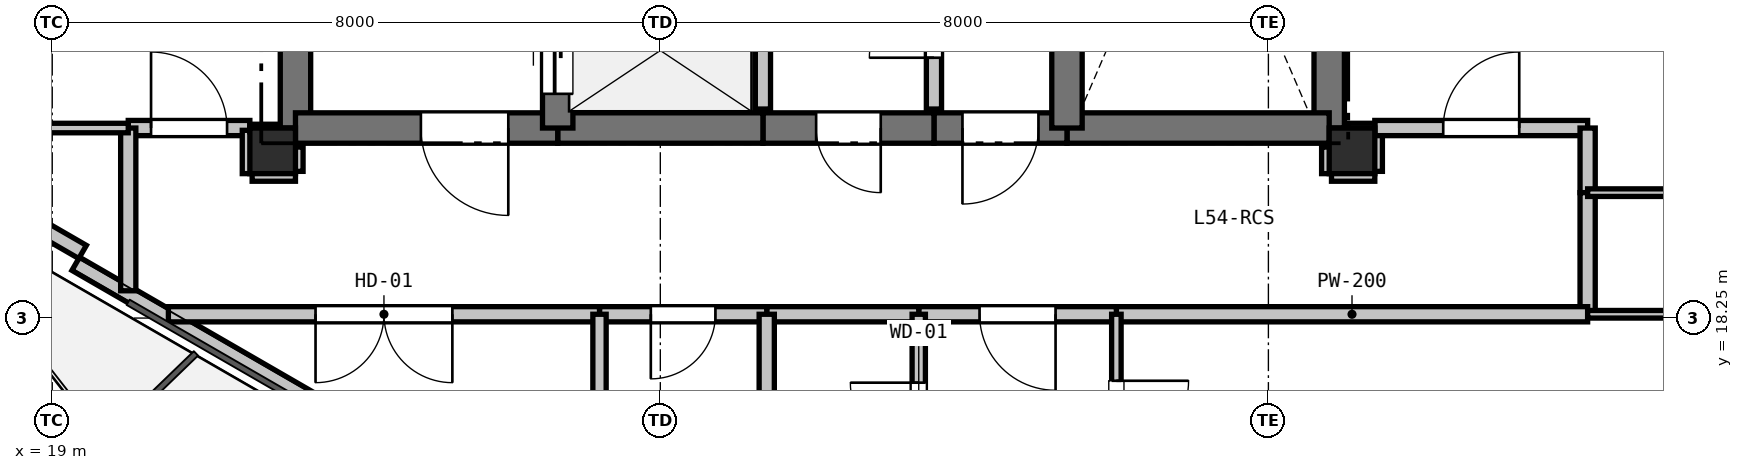
"""IFC4 building model, lengths in metres.
Left out: names, types, materials, properties, quantities, classifications, styles, units other than length and angle.
Written with IfcOpenShell. Run it as: python <this file> out.ifc"""

import sys

from ifc_helpers import new_model, si_unit, direction, frame, frame_2d, origin, origin_2d, place, context, subcontext, project, spatial, rectangle, extrude, element, fill, save


model = new_model("IFC4")
c1 = context("Model", 3, precision=1e-05, world=origin(), true_north=direction((0.0, 1.0)))
c2 = subcontext(c1, "Body", "Model", "MODEL_VIEW")
j1 = project(units=[si_unit("LENGTHUNIT", "METRE"), si_unit("PLANEANGLEUNIT", "RADIAN")], contexts=[c1])
p1 = place(None, origin())
s1 = spatial("IfcSite", under=j1, at=p1, CompositionType="ELEMENT")
p2 = place(p1, origin())
s2 = spatial("IfcBuilding", under=s1, at=p2, CompositionType="ELEMENT")
p3 = place(p2, frame((0.0, 0.0, 195.3)))
s3 = spatial("IfcBuildingStorey", under=s2, at=p3, CompositionType="ELEMENT", Elevation=195.3)
for number, where, z_axis, x_axis in (
    (1, (21.9, 20.45, 0.0), (0.0, 0.0, 1.0), (1.0, 0.0, 0.0)),
    (2, (36.1, 20.45, 0.0), (0.0, 0.0, 1.0), (1.0, 0.0, 0.0)),
):
    element("IfcColumn", number, at=place(p3, frame(where, z_axis=z_axis, x_axis=x_axis)), inside=s3, PredefinedType="COLUMN", context=c2, shape_type="SweptSolid", body=[
        extrude(rectangle(XDim=0.6, YDim=0.6, at=origin_2d()), origin(), (0.0, 0.0, 1.0), 3.3),
    ])
p4 = place(p3, frame((27.102, 14.464, 0.0), z_axis=(0.0, 0.0, 1.0), x_axis=(-0.866020680503, 0.500008180874, 0.0)))
e3 = element("IfcWall", 3, at=p4, inside=s3, PredefinedType="PARAPET", context=c2, shape_type="SweptSolid", body=[
    extrude(rectangle(XDim=8.999, YDim=0.2, at=frame_2d((4.5, 0.0))), origin(), (0.0, 0.0, 1.0), 0.2),
])
p5 = place(p3, frame((19.399, 19.12, 0.0), z_axis=(0.0, 0.0, 1.0), x_axis=(-0.86605165483, 0.499954529098, 0.0)))
e4 = element("IfcWall", 4, at=p5, inside=s3, PredefinedType="PARAPET", context=c2, shape_type="SweptSolid", body=[
    extrude(rectangle(XDim=1.7, YDim=0.2, at=frame_2d((0.85, 0.0))), origin(), (0.0, 0.0, 1.0), 2.69),
])
p6 = place(p3, frame((22.2, 20.75, 0.0), z_axis=(0.0, 0.0, 1.0), x_axis=(0.0, 1.0, 0.0)))
e5 = element("IfcWall", 5, at=p6, inside=s3, PredefinedType="SHEAR", context=c2, shape_type="SweptSolid", body=[
    extrude(rectangle(XDim=4.65, YDim=0.4, at=frame_2d((2.325, 0.0))), origin(), (0.0, 0.0, 1.0), 3.07),
])
p7 = place(p3, frame((35.8, 28.1, 0.0), z_axis=(0.0, 0.0, 1.0), x_axis=(0.0, -1.0, 0.0)))
e6 = element("IfcWall", 6, at=p7, inside=s3, PredefinedType="SHEAR", context=c2, shape_type="SweptSolid", body=[
    extrude(rectangle(XDim=7.35, YDim=0.4, at=frame_2d((3.675, 0.0))), origin(), (0.0, 0.0, 1.0), 3.07),
])
p8 = place(p3, frame((35.8, 20.75, 0.0), z_axis=(0.0, 0.0, 1.0), x_axis=(-1.0, 0.0, 0.0)))
e7 = element("IfcWall", 7, at=p8, inside=s3, PredefinedType="SHEAR", context=c2, shape_type="SweptSolid", body=[
    extrude(rectangle(XDim=3.45, YDim=0.4, at=frame_2d((1.725, 0.0))), origin(), (0.0, 0.0, 1.0), 3.07),
])
p9 = place(p3, frame((32.35, 20.75, 0.0), z_axis=(0.0, 0.0, 1.0), x_axis=(-1.0, 0.0, 0.0)))
e8 = element("IfcWall", 8, at=p9, inside=s3, PredefinedType="SHEAR", context=c2, shape_type="SweptSolid", body=[
    extrude(rectangle(XDim=1.75, YDim=0.4, at=frame_2d((0.875, 0.0))), origin(), (0.0, 0.0, 1.0), 3.07),
])
p10 = place(p9, frame((0.375, 0.0, 0.0)))
e9 = element("IfcOpeningElement", 9, at=p10, cuts=e8, PredefinedType="OPENING", context=c2, shape_type="SweptSolid", body=[
    extrude(rectangle(XDim=1.0, YDim=2.15, at=frame_2d((0.5, 1.075))), frame((0.0, 0.21, 0.0), z_axis=(0.0, -1.0, 0.0), x_axis=(1.0, 0.0, 0.0)), (0.0, 0.0, 1.0), 0.42),
])
p11 = place(p3, frame((30.6, 20.75, 0.0), z_axis=(0.0, 0.0, 1.0), x_axis=(-1.0, 0.0, 0.0)))
e10 = element("IfcWall", 10, at=p11, inside=s3, PredefinedType="SHEAR", context=c2, shape_type="SweptSolid", body=[
    extrude(rectangle(XDim=2.25, YDim=0.4, at=frame_2d((1.125, 0.0))), origin(), (0.0, 0.0, 1.0), 3.07),
])
p12 = place(p11, frame((0.7, 0.0, 0.0)))
e11 = element("IfcOpeningElement", 11, at=p12, cuts=e10, PredefinedType="OPENING", context=c2, shape_type="SweptSolid", body=[
    extrude(rectangle(XDim=0.85, YDim=2.1, at=frame_2d((0.425, 1.05))), frame((0.0, 0.21, 0.0), z_axis=(0.0, -1.0, 0.0), x_axis=(1.0, 0.0, 0.0)), (0.0, 0.0, 1.0), 0.42),
])
p13 = place(p3, frame((28.35, 20.75, 0.0), z_axis=(0.0, 0.0, 1.0), x_axis=(-1.0, 0.0, 0.0)))
e12 = element("IfcWall", 12, at=p13, inside=s3, PredefinedType="SHEAR", context=c2, shape_type="SweptSolid", body=[
    extrude(rectangle(XDim=2.7, YDim=0.4, at=frame_2d((1.35, 0.0))), origin(), (0.0, 0.0, 1.0), 3.07),
])
p14 = place(p3, frame((25.65, 20.75, 0.0), z_axis=(0.0, 0.0, 1.0), x_axis=(-1.0, 0.0, 0.0)))
e13 = element("IfcWall", 13, at=p14, inside=s3, PredefinedType="SHEAR", context=c2, shape_type="SweptSolid", body=[
    extrude(rectangle(XDim=3.45, YDim=0.4, at=frame_2d((1.725, 0.0))), origin(), (0.0, 0.0, 1.0), 3.07),
])
p15 = place(p14, frame((0.65, 0.0, 0.0)))
e14 = element("IfcOpeningElement", 14, at=p15, cuts=e13, PredefinedType="OPENING", context=c2, shape_type="SweptSolid", body=[
    extrude(rectangle(XDim=1.15, YDim=2.15, at=frame_2d((0.575, 1.075))), frame((0.0, 0.21, 0.0), z_axis=(0.0, -1.0, 0.0), x_axis=(1.0, 0.0, 0.0)), (0.0, 0.0, 1.0), 0.42),
])
p16 = place(p3, frame((25.65, 20.75, 0.0), z_axis=(0.0, 0.0, 1.0), x_axis=(0.0, 1.0, 0.0)))
e15 = element("IfcWall", 15, at=p16, inside=s3, PredefinedType="SHEAR", context=c2, shape_type="SweptSolid", body=[
    extrude(rectangle(XDim=2.0, YDim=0.4, at=frame_2d((1.0, 0.0))), origin(), (0.0, 0.0, 1.0), 3.07),
])
p17 = place(p16, frame((0.45, 0.0, 0.0)))
e16 = element("IfcOpeningElement", 16, at=p17, cuts=e15, PredefinedType="OPENING", context=c2, shape_type="SweptSolid", body=[
    extrude(rectangle(XDim=1.1, YDim=2.15, at=frame_2d((0.55, 1.075))), frame((0.0, 0.21, 0.0), z_axis=(0.0, -1.0, 0.0), x_axis=(1.0, 0.0, 0.0)), (0.0, 0.0, 1.0), 0.42),
])
p18 = place(p3, frame((32.35, 20.75, 0.0), z_axis=(0.0, 0.0, 1.0), x_axis=(0.0, 1.0, 0.0)))
e17 = element("IfcWall", 17, at=p18, inside=s3, PredefinedType="SHEAR", context=c2, shape_type="SweptSolid", body=[
    extrude(rectangle(XDim=4.8, YDim=0.4, at=frame_2d((2.4, 0.0))), origin(), (0.0, 0.0, 1.0), 3.07),
])
p19 = place(p3, frame((28.35, 23.2, 0.0), z_axis=(0.0, 0.0, 1.0), x_axis=(0.0, -1.0, 0.0)))
e18 = element("IfcWall", 18, at=p19, inside=s3, PredefinedType="PARTITIONING", context=c2, shape_type="SweptSolid", body=[
    extrude(rectangle(XDim=2.2, YDim=0.2, at=frame_2d((1.1, 0.0))), origin(), (0.0, 0.0, 1.0), 3.07),
])
p20 = place(p3, frame((30.6, 21.0, 0.0), z_axis=(0.0, 0.0, 1.0), x_axis=(0.0, 1.0, 0.0)))
e19 = element("IfcWall", 19, at=p20, inside=s3, PredefinedType="PARTITIONING", context=c2, shape_type="SweptSolid", body=[
    extrude(rectangle(XDim=2.2, YDim=0.2, at=frame_2d((1.1, 0.0))), origin(), (0.0, 0.0, 1.0), 3.07),
])
p21 = place(p20, frame((0.675, 0.0, 0.0)))
e20 = element("IfcOpeningElement", 20, at=p21, cuts=e19, PredefinedType="OPENING", context=c2, shape_type="SweptSolid", body=[
    extrude(rectangle(XDim=0.85, YDim=2.1, at=frame_2d((0.425, 1.05))), frame((0.0, 0.11, 0.0), z_axis=(0.0, -1.0, 0.0), x_axis=(1.0, 0.0, 0.0)), (0.0, 0.0, 1.0), 0.22),
])
p22 = place(p3, frame((20.0, 20.75, 0.0), z_axis=(0.0, 0.0, 1.0), x_axis=(1.0, 0.0, 0.0)))
e21 = element("IfcWall", 21, at=p22, inside=s3, PredefinedType="PARTITIONING", context=c2, shape_type="SweptSolid", body=[
    extrude(rectangle(XDim=1.6, YDim=0.2, at=frame_2d((0.8, 0.0))), origin(), (0.0, 0.0, 1.0), 2.518),
])
p23 = place(p22, frame((0.3, 0.0, 0.0)))
e22 = element("IfcOpeningElement", 22, at=p23, cuts=e21, PredefinedType="OPENING", context=c2, shape_type="SweptSolid", body=[
    extrude(rectangle(XDim=1.0, YDim=2.15, at=frame_2d((0.5, 1.075))), frame((0.0, 0.11, 0.0), z_axis=(0.0, -1.0, 0.0), x_axis=(1.0, 0.0, 0.0)), (0.0, 0.0, 1.0), 0.22),
])
for number, where, z_axis, x_axis in (
    (23, (21.6, 20.72, 0.0), (0.0, 0.0, 1.0), (0.0, -1.0, 0.0)),
    (24, (21.63, 20.15, 0.0), (0.0, 0.0, 1.0), (1.0, 0.0, 0.0)),
):
    element("IfcWall", number, at=place(p3, frame(where, z_axis=z_axis, x_axis=x_axis)), inside=s3, PredefinedType="PARTITIONING", context=c2, shape_type="SweptSolid", body=[
        extrude(rectangle(XDim=0.57, YDim=0.2, at=frame_2d((0.285, 0.0))), origin(), (0.0, 0.0, 1.0), 2.518),
    ])
p24 = place(p3, frame((22.2, 20.18, 0.0), z_axis=(0.0, 0.0, 1.0), x_axis=(0.0, 1.0, 0.0)))
e25 = element("IfcWall", 25, at=p24, inside=s3, PredefinedType="PARTITIONING", context=c2, shape_type="SweptSolid", body=[
    extrude(rectangle(XDim=0.32, YDim=0.2, at=frame_2d((0.16, 0.0))), origin(), (0.0, 0.0, 1.0), 2.518),
])
p25 = place(p3, frame((35.8, 20.5, 0.0), z_axis=(0.0, 0.0, 1.0), x_axis=(0.0, -1.0, 0.0)))
e26 = element("IfcWall", 26, at=p25, inside=s3, PredefinedType="PARTITIONING", context=c2, shape_type="SweptSolid", body=[
    extrude(rectangle(XDim=0.35, YDim=0.2, at=frame_2d((0.175, 0.0))), origin(), (0.0, 0.0, 1.0), 2.595),
])
p26 = place(p3, frame((35.83, 20.15, 0.0), z_axis=(0.0, 0.0, 1.0), x_axis=(1.0, 0.0, 0.0)))
e27 = element("IfcWall", 27, at=p26, inside=s3, PredefinedType="PARTITIONING", context=c2, shape_type="SweptSolid", body=[
    extrude(rectangle(XDim=0.57, YDim=0.2, at=frame_2d((0.285, 0.0))), origin(), (0.0, 0.0, 1.0), 2.518),
])
p27 = place(p3, frame((36.4, 20.18, 0.0), z_axis=(0.0, 0.0, 1.0), x_axis=(0.0, 1.0, 0.0)))
e28 = element("IfcWall", 28, at=p27, inside=s3, PredefinedType="PARTITIONING", context=c2, shape_type="SweptSolid", body=[
    extrude(rectangle(XDim=0.57, YDim=0.2, at=frame_2d((0.285, 0.0))), origin(), (0.0, 0.0, 1.0), 3.07),
])
p28 = place(p3, frame((36.4, 20.75, 0.0), z_axis=(0.0, 0.0, 1.0), x_axis=(1.0, 0.0, 0.0)))
e29 = element("IfcWall", 29, at=p28, inside=s3, PredefinedType="PARTITIONING", context=c2, shape_type="SweptSolid", body=[
    extrude(rectangle(XDim=2.8, YDim=0.2, at=frame_2d((1.4, 0.0))), origin(), (0.0, 0.0, 1.0), 3.07),
])
p29 = place(p28, frame((0.9, 0.0, 0.0)))
e30 = element("IfcOpeningElement", 30, at=p29, cuts=e29, PredefinedType="OPENING", context=c2, shape_type="SweptSolid", body=[
    extrude(rectangle(XDim=1.0, YDim=2.15, at=frame_2d((0.5, 1.075))), frame((0.0, 0.11, 0.0), z_axis=(0.0, -1.0, 0.0), x_axis=(1.0, 0.0, 0.0)), (0.0, 0.0, 1.0), 0.22),
])
p30 = place(p3, frame((39.2, 20.75, 0.0), z_axis=(0.0, 0.0, 1.0), x_axis=(0.0, -1.0, 0.0)))
e31 = element("IfcWall", 31, at=p30, inside=s3, PredefinedType="PARTITIONING", context=c2, shape_type="SweptSolid", body=[
    extrude(rectangle(XDim=0.85, YDim=0.2, at=frame_2d((0.425, 0.0))), origin(), (0.0, 0.0, 1.0), 3.07),
])
p31 = place(p3, frame((39.2, 19.9, 0.0), z_axis=(0.0, 0.0, 1.0), x_axis=(0.0, -1.0, 0.0)))
e32 = element("IfcWall", 32, at=p31, inside=s3, PredefinedType="PARTITIONING", context=c2, shape_type="SweptSolid", body=[
    extrude(rectangle(XDim=1.6, YDim=0.2, at=frame_2d((0.8, 0.0))), origin(), (0.0, 0.0, 1.0), 3.07),
])
p32 = place(p3, frame((39.2, 18.3, 0.0), z_axis=(0.0, 0.0, 1.0), x_axis=(-1.0, 0.0, 0.0)))
e33 = element("IfcWall", 33, at=p32, inside=s3, PredefinedType="PARTITIONING", context=c2, shape_type="SweptSolid", body=[
    extrude(rectangle(XDim=6.2, YDim=0.2, at=frame_2d((3.1, 0.0))), origin(), (0.0, 0.0, 1.0), 2.518),
])
p33 = place(p3, frame((33.0, 18.3, 0.0), z_axis=(0.0, 0.0, 1.0), x_axis=(-1.0, 0.0, 0.0)))
e34 = element("IfcWall", 34, at=p33, inside=s3, PredefinedType="PARTITIONING", context=c2, shape_type="SweptSolid", body=[
    extrude(rectangle(XDim=2.6, YDim=0.2, at=frame_2d((1.3, 0.0))), origin(), (0.0, 0.0, 1.0), 3.07),
])
p34 = place(p33, frame((0.8, 0.0, 0.0)))
e35 = element("IfcOpeningElement", 35, at=p34, cuts=e34, PredefinedType="OPENING", context=c2, shape_type="SweptSolid", body=[
    extrude(rectangle(XDim=1.0, YDim=2.15, at=frame_2d((0.5, 1.075))), frame((0.0, 0.11, 0.0), z_axis=(0.0, -1.0, 0.0), x_axis=(1.0, 0.0, 0.0)), (0.0, 0.0, 1.0), 0.22),
])
p35 = place(p3, frame((30.4, 18.3, 0.0), z_axis=(0.0, 0.0, 1.0), x_axis=(-1.0, 0.0, 0.0)))
e36 = element("IfcWall", 36, at=p35, inside=s3, PredefinedType="PARTITIONING", context=c2, shape_type="SweptSolid", body=[
    extrude(rectangle(XDim=2.0, YDim=0.2, at=frame_2d((1.0, 0.0))), origin(), (0.0, 0.0, 1.0), 3.07),
])
p36 = place(p3, frame((28.4, 18.3, 0.0), z_axis=(0.0, 0.0, 1.0), x_axis=(-1.0, 0.0, 0.0)))
e37 = element("IfcWall", 37, at=p36, inside=s3, PredefinedType="PARTITIONING", context=c2, shape_type="SweptSolid", body=[
    extrude(rectangle(XDim=2.2, YDim=0.2, at=frame_2d((1.1, 0.0))), origin(), (0.0, 0.0, 1.0), 3.07),
])
p37 = place(p36, frame((0.675, 0.0, 0.0)))
e38 = element("IfcOpeningElement", 38, at=p37, cuts=e37, PredefinedType="OPENING", context=c2, shape_type="SweptSolid", body=[
    extrude(rectangle(XDim=0.85, YDim=2.1, at=frame_2d((0.425, 1.05))), frame((0.0, 0.11, 0.0), z_axis=(0.0, -1.0, 0.0), x_axis=(1.0, 0.0, 0.0)), (0.0, 0.0, 1.0), 0.22),
])
p38 = place(p3, frame((26.2, 18.3, 0.0), z_axis=(0.0, 0.0, 1.0), x_axis=(-1.0, 0.0, 0.0)))
e39 = element("IfcWall", 39, at=p38, inside=s3, PredefinedType="PARTITIONING", context=c2, shape_type="SweptSolid", body=[
    extrude(rectangle(XDim=5.672, YDim=0.2, at=frame_2d((2.836, 0.0))), origin(), (0.0, 0.0, 1.0), 2.365),
])
p39 = place(p38, frame((1.936, 0.0, 0.0)))
e40 = element("IfcOpeningElement", 40, at=p39, cuts=e39, PredefinedType="OPENING", context=c2, shape_type="SweptSolid", body=[
    extrude(rectangle(XDim=1.8, YDim=2.2, at=frame_2d((0.9, 1.1))), frame((0.0, 0.11, 0.0), z_axis=(0.0, -1.0, 0.0), x_axis=(1.0, 0.0, 0.0)), (0.0, 0.0, 1.0), 0.22),
])
p40 = place(p3, frame((20.0, 18.609, 0.0), z_axis=(0.0, 0.0, 1.0), x_axis=(0.0, 1.0, 0.0)))
e41 = element("IfcWall", 41, at=p40, inside=s3, PredefinedType="PARTITIONING", context=c2, shape_type="SweptSolid", body=[
    extrude(rectangle(XDim=2.141, YDim=0.2, at=frame_2d((1.071, 0.0))), origin(), (0.0, 0.0, 1.0), 2.365),
])
p41 = place(p3, frame((30.4, 15.6, 0.0), z_axis=(0.0, 0.0, 1.0), x_axis=(0.0, 1.0, 0.0)))
e42 = element("IfcWall", 42, at=p41, inside=s3, PredefinedType="PLUMBINGWALL", context=c2, shape_type="SweptSolid", body=[
    extrude(rectangle(XDim=2.7, YDim=0.175, at=frame_2d((1.35, 0.0))), origin(), (0.0, 0.0, 1.0), 3.07),
])
p42 = place(p41, frame((0.9, 0.0, 0.0)))
e43 = element("IfcOpeningElement", 43, at=p42, cuts=e42, PredefinedType="OPENING", context=c2, shape_type="SweptSolid", body=[
    extrude(rectangle(XDim=0.9, YDim=2.1, at=frame_2d((0.45, 1.05))), frame((0.0, 0.097, 0.0), z_axis=(0.0, -1.0, 0.0), x_axis=(1.0, 0.0, 0.0)), (0.0, 0.0, 1.0), 0.195),
])
p43 = place(p3, frame((33.0, 18.3, 0.0), z_axis=(0.0, 0.0, 1.0), x_axis=(0.0, -1.0, 0.0)))
e44 = element("IfcWall", 44, at=p43, inside=s3, PredefinedType="PARTITIONING", context=c2, shape_type="SweptSolid", body=[
    extrude(rectangle(XDim=2.7, YDim=0.125, at=frame_2d((1.35, 0.0))), origin(), (0.0, 0.0, 1.0), 3.07),
])
p44 = place(p43, frame((0.875, 0.0, 0.0)))
e45 = element("IfcOpeningElement", 45, at=p44, cuts=e44, PredefinedType="OPENING", context=c2, shape_type="SweptSolid", body=[
    extrude(rectangle(XDim=0.95, YDim=2.1, at=frame_2d((0.475, 1.05))), frame((0.0, 0.073, 0.0), z_axis=(0.0, -1.0, 0.0), x_axis=(1.0, 0.0, 0.0)), (0.0, 0.0, 1.0), 0.145),
])
p45 = place(p3, frame((26.2, 15.6, 0.0), z_axis=(0.0, 0.0, 1.0), x_axis=(0.0, 1.0, 0.0)))
e46 = element("IfcWall", 46, at=p45, inside=s3, PredefinedType="PLUMBINGWALL", context=c2, shape_type="SweptSolid", body=[
    extrude(rectangle(XDim=2.7, YDim=0.175, at=frame_2d((1.35, 0.0))), origin(), (0.0, 0.0, 1.0), 2.365),
])
p46 = place(p3, frame((28.4, 18.3, 0.0), z_axis=(0.0, 0.0, 1.0), x_axis=(0.0, -1.0, 0.0)))
e47 = element("IfcWall", 47, at=p46, inside=s3, PredefinedType="PARTITIONING", context=c2, shape_type="SweptSolid", body=[
    extrude(rectangle(XDim=2.7, YDim=0.2, at=frame_2d((1.35, 0.0))), origin(), (0.0, 0.0, 1.0), 3.07),
])
p47 = place(p3, frame((39.2, 18.3, 0.0), z_axis=(0.0, 0.0, 1.0), x_axis=(1.0, 0.0, 0.0)))
e48 = element("IfcWall", 48, at=p47, inside=s3, PredefinedType="PARTITIONING", context=c2, shape_type="SweptSolid", body=[
    extrude(rectangle(XDim=1.252, YDim=0.1, at=frame_2d((0.626, 0.0))), origin(), (0.0, 0.0, 1.0), 2.365),
])
p48 = place(p3, frame((21.95, 20.75, 0.0), z_axis=(0.0, 0.0, 1.0), x_axis=(-1.0, 0.0, 0.0)))
e49 = element("IfcWall", 49, at=p48, inside=s3, PredefinedType="PARTITIONING", context=c2, shape_type="SweptSolid", body=[
    extrude(rectangle(XDim=0.35, YDim=0.1, at=frame_2d((0.175, 0.0))), origin(), (0.0, 0.0, 1.0), 2.595),
])
p49 = place(p3, frame((20.0, 20.75, 0.0), z_axis=(0.0, 0.0, 1.0), x_axis=(-1.0, 0.0, 0.0)))
e50 = element("IfcWall", 50, at=p49, inside=s3, PredefinedType="PARTITIONING", context=c2, shape_type="SweptSolid", body=[
    extrude(rectangle(XDim=3.5, YDim=0.125, at=frame_2d((1.75, 0.0))), origin(), (0.0, 0.0, 1.0), 2.365),
])
p50 = place(p3, frame((36.4, 20.75, 0.0), z_axis=(0.0, 0.0, 1.0), x_axis=(-1.0, 0.0, 0.0)))
e51 = element("IfcWall", 51, at=p50, inside=s3, PredefinedType="PARTITIONING", context=c2, shape_type="SweptSolid", body=[
    extrude(rectangle(XDim=0.35, YDim=0.125, at=frame_2d((0.175, 0.0))), origin(), (0.0, 0.0, 1.0), 2.595),
])
p51 = place(p3, frame((40.452, 19.9, 0.0), z_axis=(0.0, 0.0, 1.0), x_axis=(-1.0, 0.0, 0.0)))
e52 = element("IfcWall", 52, at=p51, inside=s3, PredefinedType="PARTITIONING", context=c2, shape_type="SweptSolid", body=[
    extrude(rectangle(XDim=1.252, YDim=0.1, at=frame_2d((0.626, 0.0))), origin(), (0.0, 0.0, 1.0), 2.365),
])
p52 = place(p10, origin())
e53 = element("IfcDoor", 53, at=p52, inside=s3, OperationType="SINGLE_SWING_RIGHT", PredefinedType="DOOR", context=c2, shape_type="SweptSolid", body=[
    extrude(rectangle(XDim=1.0, YDim=2.15, at=frame_2d((0.5, 1.075))), frame((0.0, 0.025, 0.0), z_axis=(0.0, -1.0, 0.0), x_axis=(1.0, 0.0, 0.0)), (0.0, 0.0, 1.0), 0.05),
])
fill(e9, e53)
p53 = place(p17, origin())
e54 = element("IfcDoor", 54, at=p53, inside=s3, OperationType="SLIDING_TO_LEFT", PredefinedType="DOOR", context=c2, shape_type="SweptSolid", body=[
    extrude(rectangle(XDim=1.1, YDim=2.15, at=frame_2d((0.55, 1.075))), frame((0.0, 0.025, 0.0), z_axis=(0.0, -1.0, 0.0), x_axis=(1.0, 0.0, 0.0)), (0.0, 0.0, 1.0), 0.05),
])
fill(e16, e54)
p54 = place(p15, origin())
e55 = element("IfcDoor", 55, at=p54, inside=s3, OperationType="SINGLE_SWING_LEFT", PredefinedType="DOOR", context=c2, shape_type="SweptSolid", body=[
    extrude(rectangle(XDim=1.15, YDim=2.15, at=frame_2d((0.575, 1.075))), frame((0.0, 0.025, 0.0), z_axis=(0.0, -1.0, 0.0), x_axis=(1.0, 0.0, 0.0)), (0.0, 0.0, 1.0), 0.05),
])
fill(e14, e55)
p55 = place(p21, origin())
e56 = element("IfcDoor", 56, at=p55, inside=s3, OperationType="SINGLE_SWING_LEFT", PredefinedType="DOOR", context=c2, shape_type="SweptSolid", body=[
    extrude(rectangle(XDim=0.85, YDim=2.1, at=frame_2d((0.425, 1.05))), frame((0.0, 0.025, 0.0), z_axis=(0.0, -1.0, 0.0), x_axis=(1.0, 0.0, 0.0)), (0.0, 0.0, 1.0), 0.05),
])
fill(e20, e56)
p56 = place(p34, origin())
e57 = element("IfcDoor", 57, at=p56, inside=s3, OperationType="SINGLE_SWING_LEFT", PredefinedType="DOOR", context=c2, shape_type="SweptSolid", body=[
    extrude(rectangle(XDim=1.0, YDim=2.15, at=frame_2d((0.5, 1.075))), frame((0.0, 0.025, 0.0), z_axis=(0.0, -1.0, 0.0), x_axis=(1.0, 0.0, 0.0)), (0.0, 0.0, 1.0), 0.05),
])
fill(e35, e57)
p57 = place(p37, origin())
e58 = element("IfcDoor", 58, at=p57, inside=s3, OperationType="SINGLE_SWING_RIGHT", PredefinedType="DOOR", context=c2, shape_type="SweptSolid", body=[
    extrude(rectangle(XDim=0.85, YDim=2.1, at=frame_2d((0.425, 1.05))), frame((0.0, 0.025, 0.0), z_axis=(0.0, -1.0, 0.0), x_axis=(1.0, 0.0, 0.0)), (0.0, 0.0, 1.0), 0.05),
])
fill(e38, e58)
p58 = place(p12, origin())
e59 = element("IfcDoor", 59, at=p58, inside=s3, OperationType="SINGLE_SWING_LEFT", PredefinedType="DOOR", context=c2, shape_type="SweptSolid", body=[
    extrude(rectangle(XDim=0.85, YDim=2.1, at=frame_2d((0.425, 1.05))), frame((0.0, 0.025, 0.0), z_axis=(0.0, -1.0, 0.0), x_axis=(1.0, 0.0, 0.0)), (0.0, 0.0, 1.0), 0.05),
])
fill(e11, e59)
p59 = place(p39, origin())
e60 = element("IfcDoor", 60, at=p59, inside=s3, OperationType="DOUBLE_DOOR_SINGLE_SWING", PredefinedType="DOOR", context=c2, shape_type="SweptSolid", body=[
    extrude(rectangle(XDim=1.8, YDim=2.2, at=frame_2d((0.9, 1.1))), frame((0.0, 0.025, 0.0), z_axis=(0.0, -1.0, 0.0), x_axis=(1.0, 0.0, 0.0)), (0.0, 0.0, 1.0), 0.05),
])
fill(e40, e60)
p60 = place(p23, origin())
e61 = element("IfcDoor", 61, at=p60, inside=s3, OperationType="SINGLE_SWING_LEFT", PredefinedType="DOOR", context=c2, shape_type="SweptSolid", body=[
    extrude(rectangle(XDim=1.0, YDim=2.15, at=frame_2d((0.5, 1.075))), frame((0.0, 0.025, 0.0), z_axis=(0.0, -1.0, 0.0), x_axis=(1.0, 0.0, 0.0)), (0.0, 0.0, 1.0), 0.05),
])
fill(e22, e61)
p61 = place(p29, origin())
e62 = element("IfcDoor", 62, at=p61, inside=s3, OperationType="SINGLE_SWING_RIGHT", PredefinedType="DOOR", context=c2, shape_type="SweptSolid", body=[
    extrude(rectangle(XDim=1.0, YDim=2.15, at=frame_2d((0.5, 1.075))), frame((0.0, 0.025, 0.0), z_axis=(0.0, -1.0, 0.0), x_axis=(1.0, 0.0, 0.0)), (0.0, 0.0, 1.0), 0.05),
])
fill(e30, e62)
p62 = place(p42, origin())
e63 = element("IfcDoor", 63, at=p62, inside=s3, OperationType="SINGLE_SWING_RIGHT", PredefinedType="DOOR", context=c2, shape_type="SweptSolid", body=[
    extrude(rectangle(XDim=0.9, YDim=2.1, at=frame_2d((0.45, 1.05))), frame((0.0, 0.025, 0.0), z_axis=(0.0, -1.0, 0.0), x_axis=(1.0, 0.0, 0.0)), (0.0, 0.0, 1.0), 0.05),
])
fill(e43, e63)
p63 = place(p44, origin())
e64 = element("IfcDoor", 64, at=p63, inside=s3, OperationType="SINGLE_SWING_LEFT", PredefinedType="DOOR", context=c2, shape_type="SweptSolid", body=[
    extrude(rectangle(XDim=0.95, YDim=2.1, at=frame_2d((0.475, 1.05))), frame((0.0, 0.025, 0.0), z_axis=(0.0, -1.0, 0.0), x_axis=(1.0, 0.0, 0.0)), (0.0, 0.0, 1.0), 0.05),
])
fill(e45, e64)
save(model, sys.argv[1])
